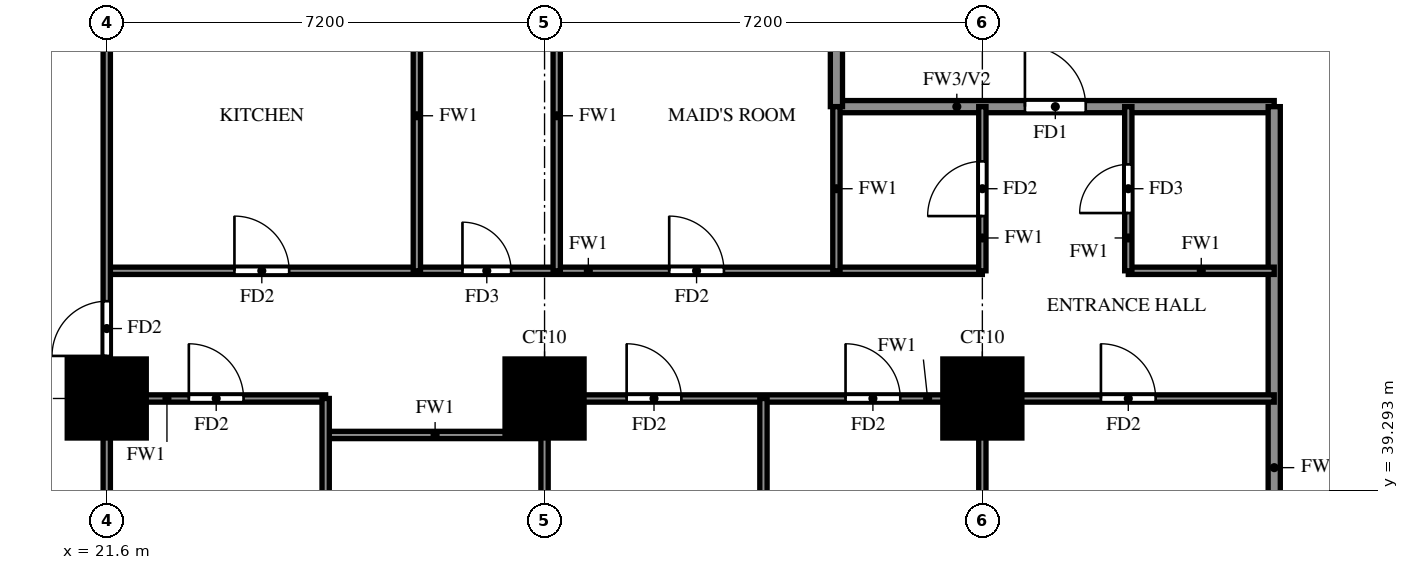
"""IFC4 building model, lengths in metres.
Left out: names, types, materials, properties, quantities, classifications, styles, units other than length and angle.
Written with IfcOpenShell. Run it as: python <this file> out.ifc"""

import sys

from ifc_helpers import new_model, si_unit, direction, frame, frame_2d, origin, origin_2d, place, context, subcontext, project, spatial, rectangle, extrude, source, transform, mapped, element, fill, save


model = new_model("IFC4")
c1 = context("Model", 3, precision=1e-05, world=origin(), true_north=direction((0.0, 1.0)))
c2 = subcontext(c1, "Body", "Model", "MODEL_VIEW")
j1 = project(units=[si_unit("LENGTHUNIT", "METRE"), si_unit("PLANEANGLEUNIT", "RADIAN")], contexts=[c1])
p1 = place(None, origin())
s1 = spatial("IfcSite", under=j1, at=p1, CompositionType="ELEMENT")
p2 = place(p1, origin())
s2 = spatial("IfcBuilding", under=s1, at=p2, CompositionType="ELEMENT")
p3 = place(p2, frame((0.0, 0.0, 83.0)))
s3 = spatial("IfcBuildingStorey", under=s2, at=p3, CompositionType="ELEMENT", Elevation=83.0)
m1 = source(origin(), c2, "Body", "SweptSolid", [
    extrude(rectangle(XDim=1.3, YDim=1.3, at=origin_2d()), origin(), (0.0, 0.0, 1.0), 3.18),
])
for number, where, z_axis, x_axis in (
    (1, (21.6, 40.8, 0.0), (0.0, 0.0, 1.0), (1.0, 0.0, 0.0)),
    (2, (28.8, 40.8, 0.0), (0.0, 0.0, 1.0), (1.0, 0.0, 0.0)),
    (3, (36.0, 40.8, 0.0), (0.0, 0.0, 1.0), (1.0, 0.0, 0.0)),
):
    element("IfcColumn", number, at=place(p3, frame(where, z_axis=z_axis, x_axis=x_axis)), inside=s3, PredefinedType="COLUMN", context=c2, shape_type="MappedRepresentation", body=[
        mapped(m1, transform((0.0, 0.0, 0.0))),
    ])
p4 = place(p3, frame((33.6, 45.6, 0.0), z_axis=(0.0, 0.0, 1.0), x_axis=(1.0, 0.0, 0.0)))
e4 = element("IfcWall", 4, at=p4, inside=s3, PredefinedType="SOLIDWALL", context=c2, shape_type="SweptSolid", body=[
    extrude(rectangle(XDim=7.2, YDim=0.2, at=frame_2d((3.6, 0.0))), origin(), (0.0, 0.0, 1.0), 3.18),
])
p5 = place(p4, frame((3.1, 0.0, 0.0)))
e5 = element("IfcOpeningElement", 5, at=p5, cuts=e4, PredefinedType="OPENING", context=c2, shape_type="SweptSolid", body=[
    extrude(rectangle(XDim=1.0, YDim=2.1, at=frame_2d((0.5, 1.05))), frame((0.0, 0.11, 0.0), z_axis=(0.0, -1.0, 0.0), x_axis=(1.0, 0.0, 0.0)), (0.0, 0.0, 1.0), 0.22),
])
p6 = place(p3, frame((33.6, 45.6, 0.0), z_axis=(0.0, 0.0, 1.0), x_axis=(0.0, 1.0, 0.0)))
e6 = element("IfcWall", 6, at=p6, inside=s3, PredefinedType="SOLIDWALL", context=c2, shape_type="SweptSolid", body=[
    extrude(rectangle(XDim=12.0, YDim=0.2, at=frame_2d((6.0, 0.0))), origin(), (0.0, 0.0, 1.0), 3.18),
])
p7 = place(p3, frame((40.8, 33.725, 0.0), z_axis=(0.0, 0.0, 1.0), x_axis=(0.0, 1.0, 0.0)))
e7 = element("IfcWall", 7, at=p7, inside=s3, PredefinedType="SOLIDWALL", context=c2, shape_type="SweptSolid", body=[
    extrude(rectangle(XDim=11.875, YDim=0.2, at=frame_2d((5.938, 0.0))), origin(), (0.0, 0.0, 1.0), 2.28),
])
p8 = place(p3, frame((25.2, 40.2, 0.0), z_axis=(0.0, 0.0, 1.0), x_axis=(1.0, 0.0, 0.0)))
e8 = element("IfcWall", 8, at=p8, inside=s3, PredefinedType="PARTITIONING", context=c2, shape_type="SweptSolid", body=[
    extrude(rectangle(XDim=3.6, YDim=0.12, at=frame_2d((1.8, 0.0))), origin(), (0.0, 0.0, 1.0), 3.18),
])
p9 = place(p3, frame((21.6, 40.8, 0.0), z_axis=(0.0, 0.0, 1.0), x_axis=(1.0, 0.0, 0.0)))
e9 = element("IfcWall", 9, at=p9, inside=s3, PredefinedType="PARTITIONING", context=c2, shape_type="SweptSolid", body=[
    extrude(rectangle(XDim=3.6, YDim=0.12, at=frame_2d((1.8, 0.0))), origin(), (0.0, 0.0, 1.0), 3.18),
])
p10 = place(p9, frame((1.35, 0.0, 0.0)))
e10 = element("IfcOpeningElement", 10, at=p10, cuts=e9, PredefinedType="OPENING", context=c2, shape_type="SweptSolid", body=[
    extrude(rectangle(XDim=0.9, YDim=2.1, at=frame_2d((0.45, 1.05))), frame((0.0, 0.07, 0.0), z_axis=(0.0, -1.0, 0.0), x_axis=(1.0, 0.0, 0.0)), (0.0, 0.0, 1.0), 0.14),
])
p11 = place(p3, frame((28.8, 40.8, 0.0), z_axis=(0.0, 0.0, 1.0), x_axis=(1.0, 0.0, 0.0)))
e11 = element("IfcWall", 11, at=p11, inside=s3, PredefinedType="PARTITIONING", context=c2, shape_type="SweptSolid", body=[
    extrude(rectangle(XDim=12.0, YDim=0.12, at=frame_2d((6.0, 0.0))), origin(), (0.0, 0.0, 1.0), 3.18),
])
p12 = place(p11, frame((1.35, 0.0, 0.0)))
e12 = element("IfcOpeningElement", 12, at=p12, cuts=e11, PredefinedType="OPENING", context=c2, shape_type="SweptSolid", body=[
    extrude(rectangle(XDim=0.9, YDim=2.1, at=frame_2d((0.45, 1.05))), frame((0.0, 0.07, 0.0), z_axis=(0.0, -1.0, 0.0), x_axis=(1.0, 0.0, 0.0)), (0.0, 0.0, 1.0), 0.14),
])
p13 = place(p11, frame((4.95, 0.0, 0.0)))
e13 = element("IfcOpeningElement", 13, at=p13, cuts=e11, PredefinedType="OPENING", context=c2, shape_type="SweptSolid", body=[
    extrude(rectangle(XDim=0.9, YDim=2.1, at=frame_2d((0.45, 1.05))), frame((0.0, 0.07, 0.0), z_axis=(0.0, -1.0, 0.0), x_axis=(1.0, 0.0, 0.0)), (0.0, 0.0, 1.0), 0.14),
])
p14 = place(p11, frame((9.15, 0.0, 0.0)))
e14 = element("IfcOpeningElement", 14, at=p14, cuts=e11, PredefinedType="OPENING", context=c2, shape_type="SweptSolid", body=[
    extrude(rectangle(XDim=0.9, YDim=2.1, at=frame_2d((0.45, 1.05))), frame((0.0, 0.07, 0.0), z_axis=(0.0, -1.0, 0.0), x_axis=(1.0, 0.0, 0.0)), (0.0, 0.0, 1.0), 0.14),
])
p15 = place(p3, frame((21.6, 42.9, 0.0), z_axis=(0.0, 0.0, 1.0), x_axis=(1.0, 0.0, 0.0)))
e15 = element("IfcWall", 15, at=p15, inside=s3, PredefinedType="PARTITIONING", context=c2, shape_type="SweptSolid", body=[
    extrude(rectangle(XDim=14.4, YDim=0.12, at=frame_2d((7.2, 0.0))), origin(), (0.0, 0.0, 1.0), 3.18),
])
p16 = place(p15, frame((2.1, 0.0, 0.0)))
e16 = element("IfcOpeningElement", 16, at=p16, cuts=e15, PredefinedType="OPENING", context=c2, shape_type="SweptSolid", body=[
    extrude(rectangle(XDim=0.9, YDim=2.1, at=frame_2d((0.45, 1.05))), frame((0.0, 0.07, 0.0), z_axis=(0.0, -1.0, 0.0), x_axis=(1.0, 0.0, 0.0)), (0.0, 0.0, 1.0), 0.14),
])
p17 = place(p15, frame((5.85, 0.0, 0.0)))
e17 = element("IfcOpeningElement", 17, at=p17, cuts=e15, PredefinedType="OPENING", context=c2, shape_type="SweptSolid", body=[
    extrude(rectangle(XDim=0.8, YDim=2.1, at=frame_2d((0.4, 1.05))), frame((0.0, 0.07, 0.0), z_axis=(0.0, -1.0, 0.0), x_axis=(1.0, 0.0, 0.0)), (0.0, 0.0, 1.0), 0.14),
])
p18 = place(p15, frame((9.25, 0.0, 0.0)))
e18 = element("IfcOpeningElement", 18, at=p18, cuts=e15, PredefinedType="OPENING", context=c2, shape_type="SweptSolid", body=[
    extrude(rectangle(XDim=0.9, YDim=2.1, at=frame_2d((0.45, 1.05))), frame((0.0, 0.07, 0.0), z_axis=(0.0, -1.0, 0.0), x_axis=(1.0, 0.0, 0.0)), (0.0, 0.0, 1.0), 0.14),
])
p19 = place(p3, frame((38.4, 42.9, 0.0), z_axis=(0.0, 0.0, 1.0), x_axis=(1.0, 0.0, 0.0)))
e19 = element("IfcWall", 19, at=p19, inside=s3, PredefinedType="PARTITIONING", context=c2, shape_type="SweptSolid", body=[
    extrude(rectangle(XDim=2.4, YDim=0.12, at=frame_2d((1.2, 0.0))), origin(), (0.0, 0.0, 1.0), 3.18),
])
p20 = place(p3, frame((21.6, 33.725, 0.0), z_axis=(0.0, 0.0, 1.0), x_axis=(0.0, 1.0, 0.0)))
e20 = element("IfcWall", 20, at=p20, inside=s3, PredefinedType="PARTITIONING", context=c2, shape_type="SweptSolid", body=[
    extrude(rectangle(XDim=32.275, YDim=0.12, at=frame_2d((16.137, 0.0))), origin(), (0.0, 0.0, 1.0), 3.18),
])
p21 = place(p20, frame((7.775, 0.0, 0.0)))
e21 = element("IfcOpeningElement", 21, at=p21, cuts=e20, PredefinedType="OPENING", context=c2, shape_type="SweptSolid", body=[
    extrude(rectangle(XDim=0.9, YDim=2.1, at=frame_2d((0.45, 1.05))), frame((0.0, 0.07, 0.0), z_axis=(0.0, -1.0, 0.0), x_axis=(1.0, 0.0, 0.0)), (0.0, 0.0, 1.0), 0.14),
])
p22 = place(p20, frame((15.625, 0.0, 0.0)))
e22 = element("IfcOpeningElement", 22, at=p22, cuts=e20, PredefinedType="OPENING", context=c2, shape_type="SweptSolid", body=[
    extrude(rectangle(XDim=0.9, YDim=2.1, at=frame_2d((0.45, 1.05))), frame((0.0, 0.07, 0.0), z_axis=(0.0, -1.0, 0.0), x_axis=(1.0, 0.0, 0.0)), (0.0, 0.0, 1.0), 0.14),
])
p23 = place(p20, frame((22.225, 0.0, 0.0)))
e23 = element("IfcOpeningElement", 23, at=p23, cuts=e20, PredefinedType="OPENING", context=c2, shape_type="SweptSolid", body=[
    extrude(rectangle(XDim=1.5, YDim=2.1, at=frame_2d((0.75, 1.05))), frame((0.0, 0.07, 0.0), z_axis=(0.0, -1.0, 0.0), x_axis=(1.0, 0.0, 0.0)), (0.0, 0.0, 1.0), 0.14),
])
p24 = place(p20, frame((26.425, 0.0, 0.0)))
e24 = element("IfcOpeningElement", 24, at=p24, cuts=e20, PredefinedType="OPENING", context=c2, shape_type="SweptSolid", body=[
    extrude(rectangle(XDim=0.9, YDim=2.1, at=frame_2d((0.45, 1.05))), frame((0.0, 0.07, 0.0), z_axis=(0.0, -1.0, 0.0), x_axis=(1.0, 0.0, 0.0)), (0.0, 0.0, 1.0), 0.14),
])
p25 = place(p20, frame((30.025, 0.0, 0.0)))
e25 = element("IfcOpeningElement", 25, at=p25, cuts=e20, PredefinedType="OPENING", context=c2, shape_type="SweptSolid", body=[
    extrude(rectangle(XDim=0.9, YDim=2.1, at=frame_2d((0.45, 1.05))), frame((0.0, 0.07, 0.0), z_axis=(0.0, -1.0, 0.0), x_axis=(1.0, 0.0, 0.0)), (0.0, 0.0, 1.0), 0.14),
])
p26 = place(p3, frame((25.2, 33.725, 0.0), z_axis=(0.0, 0.0, 1.0), x_axis=(0.0, 1.0, 0.0)))
e26 = element("IfcWall", 26, at=p26, inside=s3, PredefinedType="PARTITIONING", context=c2, shape_type="SweptSolid", body=[
    extrude(rectangle(XDim=7.075, YDim=0.12, at=frame_2d((3.538, 0.0))), origin(), (0.0, 0.0, 1.0), 2.28),
])
p27 = place(p26, frame((2.837, 0.0, 0.0)))
e27 = element("IfcOpeningElement", 27, at=p27, cuts=e26, PredefinedType="OPENING", context=c2, shape_type="SweptSolid", body=[
    extrude(rectangle(XDim=0.8, YDim=2.1, at=frame_2d((0.4, 1.05))), frame((0.0, 0.07, 0.0), z_axis=(0.0, -1.0, 0.0), x_axis=(1.0, 0.0, 0.0)), (0.0, 0.0, 1.0), 0.14),
])
p28 = place(p3, frame((26.7, 42.9, 0.0), z_axis=(0.0, 0.0, 1.0), x_axis=(0.0, 1.0, 0.0)))
e28 = element("IfcWall", 28, at=p28, inside=s3, PredefinedType="PARTITIONING", context=c2, shape_type="SweptSolid", body=[
    extrude(rectangle(XDim=5.1, YDim=0.12, at=frame_2d((2.55, 0.0))), origin(), (0.0, 0.0, 1.0), 3.18),
])
p29 = place(p3, frame((28.8, 33.725, 0.0), z_axis=(0.0, 0.0, 1.0), x_axis=(0.0, 1.0, 0.0)))
e29 = element("IfcWall", 29, at=p29, inside=s3, PredefinedType="PARTITIONING", context=c2, shape_type="SweptSolid", body=[
    extrude(rectangle(XDim=7.075, YDim=0.12, at=frame_2d((3.538, 0.0))), origin(), (0.0, 0.0, 1.0), 3.18),
])
p30 = place(p3, frame((29.0, 42.9, 0.0), z_axis=(0.0, 0.0, 1.0), x_axis=(0.0, 1.0, 0.0)))
e30 = element("IfcWall", 30, at=p30, inside=s3, PredefinedType="PARTITIONING", context=c2, shape_type="SweptSolid", body=[
    extrude(rectangle(XDim=5.1, YDim=0.12, at=frame_2d((2.55, 0.0))), origin(), (0.0, 0.0, 1.0), 3.18),
])
p31 = place(p3, frame((32.4, 33.725, 0.0), z_axis=(0.0, 0.0, 1.0), x_axis=(0.0, 1.0, 0.0)))
e31 = element("IfcWall", 31, at=p31, inside=s3, PredefinedType="PARTITIONING", context=c2, shape_type="SweptSolid", body=[
    extrude(rectangle(XDim=7.075, YDim=0.12, at=frame_2d((3.538, 0.0))), origin(), (0.0, 0.0, 1.0), 2.28),
])
p32 = place(p3, frame((33.6, 42.9, 0.0), z_axis=(0.0, 0.0, 1.0), x_axis=(0.0, 1.0, 0.0)))
e32 = element("IfcWall", 32, at=p32, inside=s3, PredefinedType="PARTITIONING", context=c2, shape_type="SweptSolid", body=[
    extrude(rectangle(XDim=2.7, YDim=0.12, at=frame_2d((1.35, 0.0))), origin(), (0.0, 0.0, 1.0), 3.18),
])
p33 = place(p3, frame((36.0, 33.725, 0.0), z_axis=(0.0, 0.0, 1.0), x_axis=(0.0, 1.0, 0.0)))
e33 = element("IfcWall", 33, at=p33, inside=s3, PredefinedType="PARTITIONING", context=c2, shape_type="SweptSolid", body=[
    extrude(rectangle(XDim=7.075, YDim=0.12, at=frame_2d((3.538, 0.0))), origin(), (0.0, 0.0, 1.0), 3.18),
])
p34 = place(p3, frame((36.0, 42.9, 0.0), z_axis=(0.0, 0.0, 1.0), x_axis=(0.0, 1.0, 0.0)))
e34 = element("IfcWall", 34, at=p34, inside=s3, PredefinedType="PARTITIONING", context=c2, shape_type="SweptSolid", body=[
    extrude(rectangle(XDim=2.7, YDim=0.12, at=frame_2d((1.35, 0.0))), origin(), (0.0, 0.0, 1.0), 3.18),
])
p35 = place(p34, frame((0.9, 0.0, 0.0)))
e35 = element("IfcOpeningElement", 35, at=p35, cuts=e34, PredefinedType="OPENING", context=c2, shape_type="SweptSolid", body=[
    extrude(rectangle(XDim=0.9, YDim=2.1, at=frame_2d((0.45, 1.05))), frame((0.0, 0.07, 0.0), z_axis=(0.0, -1.0, 0.0), x_axis=(1.0, 0.0, 0.0)), (0.0, 0.0, 1.0), 0.14),
])
p36 = place(p3, frame((38.4, 42.9, 0.0), z_axis=(0.0, 0.0, 1.0), x_axis=(0.0, 1.0, 0.0)))
e36 = element("IfcWall", 36, at=p36, inside=s3, PredefinedType="PARTITIONING", context=c2, shape_type="SweptSolid", body=[
    extrude(rectangle(XDim=2.7, YDim=0.12, at=frame_2d((1.35, 0.0))), origin(), (0.0, 0.0, 1.0), 3.18),
])
p37 = place(p36, frame((0.95, 0.0, 0.0)))
e37 = element("IfcOpeningElement", 37, at=p37, cuts=e36, PredefinedType="OPENING", context=c2, shape_type="SweptSolid", body=[
    extrude(rectangle(XDim=0.8, YDim=2.1, at=frame_2d((0.4, 1.05))), frame((0.0, 0.07, 0.0), z_axis=(0.0, -1.0, 0.0), x_axis=(1.0, 0.0, 0.0)), (0.0, 0.0, 1.0), 0.14),
])
p38 = place(p5, origin())
e38 = element("IfcDoor", 38, at=p38, inside=s3, OperationType="SINGLE_SWING_RIGHT", PredefinedType="DOOR", context=c2, shape_type="SweptSolid", body=[
    extrude(rectangle(XDim=1.0, YDim=2.1, at=frame_2d((0.5, 1.05))), frame((0.0, 0.025, 0.0), z_axis=(0.0, -1.0, 0.0), x_axis=(1.0, 0.0, 0.0)), (0.0, 0.0, 1.0), 0.05),
])
fill(e5, e38)
p39 = place(p21, origin())
e39 = element("IfcDoor", 39, at=p39, inside=s3, OperationType="SINGLE_SWING_RIGHT", PredefinedType="DOOR", context=c2, shape_type="SweptSolid", body=[
    extrude(rectangle(XDim=0.9, YDim=2.1, at=frame_2d((0.45, 1.05))), frame((0.0, 0.025, 0.0), z_axis=(0.0, -1.0, 0.0), x_axis=(1.0, 0.0, 0.0)), (0.0, 0.0, 1.0), 0.05),
])
fill(e21, e39)
p40 = place(p10, origin())
e40 = element("IfcDoor", 40, at=p40, inside=s3, OperationType="SINGLE_SWING_LEFT", PredefinedType="DOOR", context=c2, shape_type="SweptSolid", body=[
    extrude(rectangle(XDim=0.9, YDim=2.1, at=frame_2d((0.45, 1.05))), frame((0.0, 0.025, 0.0), z_axis=(0.0, -1.0, 0.0), x_axis=(1.0, 0.0, 0.0)), (0.0, 0.0, 1.0), 0.05),
])
fill(e10, e40)
p41 = place(p12, origin())
e41 = element("IfcDoor", 41, at=p41, inside=s3, OperationType="SINGLE_SWING_LEFT", PredefinedType="DOOR", context=c2, shape_type="SweptSolid", body=[
    extrude(rectangle(XDim=0.9, YDim=2.1, at=frame_2d((0.45, 1.05))), frame((0.0, 0.025, 0.0), z_axis=(0.0, -1.0, 0.0), x_axis=(1.0, 0.0, 0.0)), (0.0, 0.0, 1.0), 0.05),
])
fill(e12, e41)
p42 = place(p13, origin())
e42 = element("IfcDoor", 42, at=p42, inside=s3, OperationType="SINGLE_SWING_LEFT", PredefinedType="DOOR", context=c2, shape_type="SweptSolid", body=[
    extrude(rectangle(XDim=0.9, YDim=2.1, at=frame_2d((0.45, 1.05))), frame((0.0, 0.025, 0.0), z_axis=(0.0, -1.0, 0.0), x_axis=(1.0, 0.0, 0.0)), (0.0, 0.0, 1.0), 0.05),
])
fill(e13, e42)
p43 = place(p14, origin())
e43 = element("IfcDoor", 43, at=p43, inside=s3, OperationType="SINGLE_SWING_RIGHT", PredefinedType="DOOR", context=c2, shape_type="SweptSolid", body=[
    extrude(rectangle(XDim=0.9, YDim=2.1, at=frame_2d((0.45, 1.05))), frame((0.0, 0.025, 0.0), z_axis=(0.0, -1.0, 0.0), x_axis=(1.0, 0.0, 0.0)), (0.0, 0.0, 1.0), 0.05),
])
fill(e14, e43)
p44 = place(p16, origin())
e44 = element("IfcDoor", 44, at=p44, inside=s3, OperationType="SINGLE_SWING_LEFT", PredefinedType="DOOR", context=c2, shape_type="SweptSolid", body=[
    extrude(rectangle(XDim=0.9, YDim=2.1, at=frame_2d((0.45, 1.05))), frame((0.0, 0.025, 0.0), z_axis=(0.0, -1.0, 0.0), x_axis=(1.0, 0.0, 0.0)), (0.0, 0.0, 1.0), 0.05),
])
fill(e16, e44)
p45 = place(p17, origin())
e45 = element("IfcDoor", 45, at=p45, inside=s3, OperationType="SINGLE_SWING_LEFT", PredefinedType="DOOR", context=c2, shape_type="SweptSolid", body=[
    extrude(rectangle(XDim=0.8, YDim=2.1, at=frame_2d((0.4, 1.05))), frame((0.0, 0.025, 0.0), z_axis=(0.0, -1.0, 0.0), x_axis=(1.0, 0.0, 0.0)), (0.0, 0.0, 1.0), 0.05),
])
fill(e17, e45)
p46 = place(p18, origin())
e46 = element("IfcDoor", 46, at=p46, inside=s3, OperationType="SINGLE_SWING_RIGHT", PredefinedType="DOOR", context=c2, shape_type="SweptSolid", body=[
    extrude(rectangle(XDim=0.9, YDim=2.1, at=frame_2d((0.45, 1.05))), frame((0.0, 0.025, 0.0), z_axis=(0.0, -1.0, 0.0), x_axis=(1.0, 0.0, 0.0)), (0.0, 0.0, 1.0), 0.05),
])
fill(e18, e46)
p47 = place(p35, origin())
e47 = element("IfcDoor", 47, at=p47, inside=s3, OperationType="SINGLE_SWING_LEFT", PredefinedType="DOOR", context=c2, shape_type="SweptSolid", body=[
    extrude(rectangle(XDim=0.9, YDim=2.1, at=frame_2d((0.45, 1.05))), frame((0.0, 0.025, 0.0), z_axis=(0.0, -1.0, 0.0), x_axis=(1.0, 0.0, 0.0)), (0.0, 0.0, 1.0), 0.05),
])
fill(e35, e47)
p48 = place(p37, origin())
e48 = element("IfcDoor", 48, at=p48, inside=s3, OperationType="SINGLE_SWING_LEFT", PredefinedType="DOOR", context=c2, shape_type="SweptSolid", body=[
    extrude(rectangle(XDim=0.8, YDim=2.1, at=frame_2d((0.4, 1.05))), frame((0.0, 0.025, 0.0), z_axis=(0.0, -1.0, 0.0), x_axis=(1.0, 0.0, 0.0)), (0.0, 0.0, 1.0), 0.05),
])
fill(e37, e48)
save(model, sys.argv[1])
